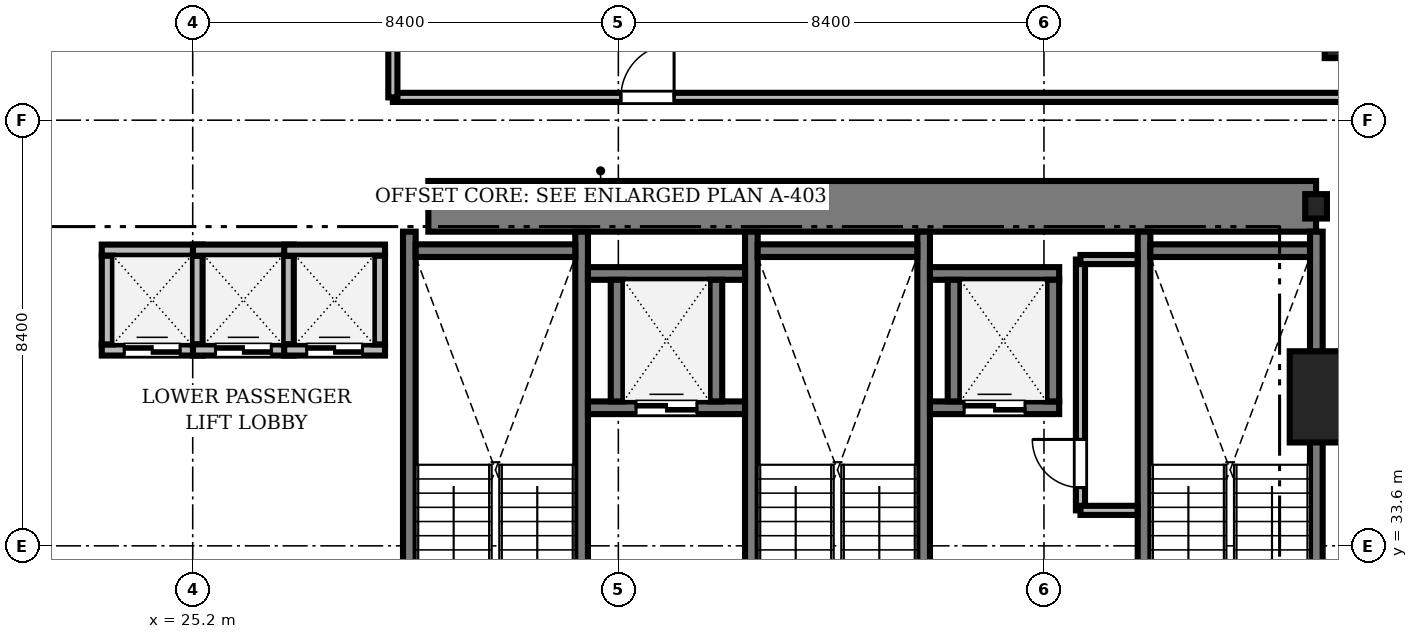
"""IFC4 building model, lengths in metres.
Left out: names, types, materials, properties, quantities, classifications, styles, units other than length and angle.
Written with IfcOpenShell. Run it as: python <this file> out.ifc"""

import sys

from ifc_helpers import new_model, si_unit, direction, frame, frame_2d, origin, origin_2d, place, context, subcontext, project, spatial, rectangle, i_section, extrude, source, transform, mapped, element, fill, save


model = new_model("IFC4")
c1 = context("Model", 3, precision=1e-05, world=origin(), true_north=direction((0.0, 1.0)))
c2 = subcontext(c1, "Body", "Model", "MODEL_VIEW")
j1 = project(units=[si_unit("LENGTHUNIT", "METRE"), si_unit("PLANEANGLEUNIT", "RADIAN")], contexts=[c1])
p1 = place(None, origin())
s1 = spatial("IfcSite", under=j1, at=p1, CompositionType="ELEMENT")
p2 = place(p1, origin())
s2 = spatial("IfcBuilding", under=s1, at=p2, CompositionType="ELEMENT")
p3 = place(p2, frame((0.0, 0.0, 75.05)))
s3 = spatial("IfcBuildingStorey", under=s2, at=p3, CompositionType="ELEMENT", Elevation=75.05)
m1 = source(origin(), c2, "Body", "SweptSolid", [
    extrude(rectangle(XDim=17.52, YDim=1.0, at=frame_2d((8.76, 0.0))), origin(), (0.0, 0.0, 1.0), 3.41),
])
p4 = place(p3, frame((29.85, 40.3, 0.0), z_axis=(0.0, 0.0, 1.0), x_axis=(1.0, 0.0, 0.0)))
e1 = element("IfcWall", 1, at=p4, inside=s3, PredefinedType="SHEAR", context=c2, shape_type="MappedRepresentation", body=[
    mapped(m1, transform((0.0, 0.0, 0.0), scale=1.0)),
])
m2 = source(origin(), c2, "Body", "SweptSolid", [
    extrude(i_section(OverallWidth=0.428, OverallDepth=0.481, WebThickness=0.04, FlangeThickness=0.063, FilletRadius=0.015, at=origin_2d()), origin(), (0.0, 0.0, 1.0), 3.41),
])
p5 = place(p3, frame((47.37, 40.3, 0.0), z_axis=(0.0, 0.0, 1.0), x_axis=(1.0, 0.0, 0.0)))
e2 = element("IfcColumn", 2, at=p5, inside=s3, PredefinedType="COLUMN", context=c2, shape_type="MappedRepresentation", body=[
    mapped(m2, transform((0.0, 0.0, 0.0), scale=1.0)),
])
m3 = source(origin(), c2, "Body", "SweptSolid", [
    extrude(rectangle(XDim=1.8, YDim=1.8, at=origin_2d()), origin(), (0.0, 0.0, 1.0), 3.41),
])
p6 = place(p3, frame((47.75, 36.54, 0.0), z_axis=(0.0, 0.0, 1.0), x_axis=(1.0, 0.0, 0.0)))
e3 = element("IfcColumn", 3, at=p6, inside=s3, PredefinedType="COLUMN", context=c2, shape_type="MappedRepresentation", body=[
    mapped(m3, transform((0.0, 0.0, 0.0), scale=1.0)),
])
m4 = source(origin(), c2, "Body", "SweptSolid", [
    extrude(i_section(OverallWidth=0.419, OverallDepth=0.449, WebThickness=0.031, FlangeThickness=0.048, FilletRadius=0.015, at=origin_2d()), origin(), (0.0, 0.0, 1.0), 3.41),
])
p7 = place(p3, frame((47.75, 43.45, 0.0), z_axis=(0.0, 0.0, 1.0), x_axis=(1.0, 0.0, 0.0)))
e4 = element("IfcColumn", 4, at=p7, inside=s3, PredefinedType="COLUMN", context=c2, shape_type="MappedRepresentation", body=[
    mapped(m4, transform((0.0, 0.0, 0.0), scale=1.0)),
])
m5 = source(origin(), c2, "Body", "SweptSolid", [
    extrude(rectangle(XDim=9.15, YDim=0.25, at=frame_2d((4.575, 0.0))), origin(), (0.0, 0.0, 1.0), 3.45),
])
for number, where, z_axis, x_axis in (
    (5, (29.475, 30.65, 0.0), (0.0, 0.0, 1.0), (0.0, 1.0, 0.0)),
    (6, (32.875, 30.65, 0.0), (0.0, 0.0, 1.0), (0.0, 1.0, 0.0)),
):
    element("IfcWall", number, at=place(p3, frame(where, z_axis=z_axis, x_axis=x_axis)), inside=s3, PredefinedType="SOLIDWALL", context=c2, shape_type="MappedRepresentation", body=[
        mapped(m5, transform((0.0, 0.0, 0.0), scale=1.0)),
    ])
m6 = source(origin(), c2, "Body", "SweptSolid", [
    extrude(rectangle(XDim=3.15, YDim=0.25, at=frame_2d((1.575, 0.0))), origin(), (0.0, 0.0, 1.0), 3.45),
])
p8 = place(p3, frame((29.6, 39.425, 0.0), z_axis=(0.0, 0.0, 1.0), x_axis=(1.0, 0.0, 0.0)))
e7 = element("IfcWall", 7, at=p8, inside=s3, PredefinedType="SOLIDWALL", context=c2, shape_type="MappedRepresentation", body=[
    mapped(m6, transform((0.0, 0.0, 0.0), scale=1.0)),
])
for number, where, z_axis, x_axis in (
    (8, (36.225, 30.65, 0.0), (0.0, 0.0, 1.0), (0.0, 1.0, 0.0)),
    (9, (39.625, 30.65, 0.0), (0.0, 0.0, 1.0), (0.0, 1.0, 0.0)),
):
    element("IfcWall", number, at=place(p3, frame(where, z_axis=z_axis, x_axis=x_axis)), inside=s3, PredefinedType="SOLIDWALL", context=c2, shape_type="MappedRepresentation", body=[
        mapped(m5, transform((0.0, 0.0, 0.0), scale=1.0)),
    ])
p9 = place(p3, frame((36.35, 39.425, 0.0), z_axis=(0.0, 0.0, 1.0), x_axis=(1.0, 0.0, 0.0)))
e10 = element("IfcWall", 10, at=p9, inside=s3, PredefinedType="SOLIDWALL", context=c2, shape_type="MappedRepresentation", body=[
    mapped(m6, transform((0.0, 0.0, 0.0), scale=1.0)),
])
for number, where, z_axis, x_axis in (
    (11, (43.975, 30.65, 0.0), (0.0, 0.0, 1.0), (0.0, 1.0, 0.0)),
    (12, (47.375, 30.65, 0.0), (0.0, 0.0, 1.0), (0.0, 1.0, 0.0)),
):
    element("IfcWall", number, at=place(p3, frame(where, z_axis=z_axis, x_axis=x_axis)), inside=s3, PredefinedType="SOLIDWALL", context=c2, shape_type="MappedRepresentation", body=[
        mapped(m5, transform((0.0, 0.0, 0.0), scale=1.0)),
    ])
p10 = place(p3, frame((44.1, 39.425, 0.0), z_axis=(0.0, 0.0, 1.0), x_axis=(1.0, 0.0, 0.0)))
e13 = element("IfcWall", 13, at=p10, inside=s3, PredefinedType="SOLIDWALL", context=c2, shape_type="MappedRepresentation", body=[
    mapped(m6, transform((0.0, 0.0, 0.0), scale=1.0)),
])
m7 = source(origin(), c2, "Body", "SweptSolid", [
    extrude(rectangle(XDim=1.99, YDim=0.22, at=frame_2d((0.995, 0.0))), origin(), (0.0, 0.0, 1.0), 3.41),
])
p11 = place(p3, frame((23.405, 37.465, 0.0), z_axis=(0.0, 0.0, 1.0), x_axis=(1.0, 0.0, 0.0)))
e14 = element("IfcWall", 14, at=p11, inside=s3, PredefinedType="SOLIDWALL", context=c2, shape_type="MappedRepresentation", body=[
    mapped(m7, transform((0.0, 0.0, 0.0), scale=1.0)),
])
m8 = source(origin(), c2, "Body", "SweptSolid", [
    extrude(rectangle(XDim=1.1, YDim=2.2, at=frame_2d((0.55, 1.1))), frame((0.0, 0.12, 0.0), z_axis=(0.0, -1.0, 0.0), x_axis=(1.0, 0.0, 0.0)), (0.0, 0.0, 1.0), 0.24),
])
p12 = place(p11, frame((0.445, 0.0, 0.0)))
e15 = element("IfcOpeningElement", 15, at=p12, cuts=e14, PredefinedType="OPENING", context=c2, shape_type="MappedRepresentation", body=[
    mapped(m8, transform((0.0, 0.0, 0.0), scale=1.0)),
])
p13 = place(p3, frame((23.405, 39.435, 0.0), z_axis=(0.0, 0.0, 1.0), x_axis=(1.0, 0.0, 0.0)))
e16 = element("IfcWall", 16, at=p13, inside=s3, PredefinedType="SOLIDWALL", context=c2, shape_type="MappedRepresentation", body=[
    mapped(m7, transform((0.0, 0.0, 0.0), scale=1.0)),
])
m9 = source(origin(), c2, "Body", "SweptSolid", [
    extrude(rectangle(XDim=1.75, YDim=0.22, at=frame_2d((0.875, 0.0))), origin(), (0.0, 0.0, 1.0), 3.41),
])
for number, where, z_axis, x_axis in (
    (17, (23.515, 37.575, 0.0), (0.0, 0.0, 1.0), (0.0, 1.0, 0.0)),
    (18, (25.285, 37.575, 0.0), (0.0, 0.0, 1.0), (0.0, 1.0, 0.0)),
):
    element("IfcWall", number, at=place(p3, frame(where, z_axis=z_axis, x_axis=x_axis)), inside=s3, PredefinedType="SOLIDWALL", context=c2, shape_type="MappedRepresentation", body=[
        mapped(m9, transform((0.0, 0.0, 0.0), scale=1.0)),
    ])
p14 = place(p3, frame((25.205, 37.465, 0.0), z_axis=(0.0, 0.0, 1.0), x_axis=(1.0, 0.0, 0.0)))
e19 = element("IfcWall", 19, at=p14, inside=s3, PredefinedType="SOLIDWALL", context=c2, shape_type="MappedRepresentation", body=[
    mapped(m7, transform((0.0, 0.0, 0.0), scale=1.0)),
])
p15 = place(p14, frame((0.445, 0.0, 0.0)))
e20 = element("IfcOpeningElement", 20, at=p15, cuts=e19, PredefinedType="OPENING", context=c2, shape_type="MappedRepresentation", body=[
    mapped(m8, transform((0.0, 0.0, 0.0), scale=1.0)),
])
p16 = place(p3, frame((25.205, 39.435, 0.0), z_axis=(0.0, 0.0, 1.0), x_axis=(1.0, 0.0, 0.0)))
e21 = element("IfcWall", 21, at=p16, inside=s3, PredefinedType="SOLIDWALL", context=c2, shape_type="MappedRepresentation", body=[
    mapped(m7, transform((0.0, 0.0, 0.0), scale=1.0)),
])
p17 = place(p3, frame((27.085, 37.575, 0.0), z_axis=(0.0, 0.0, 1.0), x_axis=(0.0, 1.0, 0.0)))
e22 = element("IfcWall", 22, at=p17, inside=s3, PredefinedType="SOLIDWALL", context=c2, shape_type="MappedRepresentation", body=[
    mapped(m9, transform((0.0, 0.0, 0.0), scale=1.0)),
])
m10 = source(origin(), c2, "Body", "SweptSolid", [
    extrude(rectangle(XDim=1.99, YDim=0.22, at=frame_2d((0.995, 0.0))), origin(), (0.0, 0.0, 1.0), 3.41),
])
p18 = place(p3, frame((27.005, 37.465, 0.0), z_axis=(0.0, 0.0, 1.0), x_axis=(1.0, 0.0, 0.0)))
e23 = element("IfcWall", 23, at=p18, inside=s3, PredefinedType="SOLIDWALL", context=c2, shape_type="MappedRepresentation", body=[
    mapped(m10, transform((0.0, 0.0, 0.0), scale=1.0)),
])
p19 = place(p18, frame((0.445, 0.0, 0.0)))
e24 = element("IfcOpeningElement", 24, at=p19, cuts=e23, PredefinedType="OPENING", context=c2, shape_type="MappedRepresentation", body=[
    mapped(m8, transform((0.0, 0.0, 0.0), scale=1.0)),
])
p20 = place(p3, frame((27.005, 39.435, 0.0), z_axis=(0.0, 0.0, 1.0), x_axis=(1.0, 0.0, 0.0)))
e25 = element("IfcWall", 25, at=p20, inside=s3, PredefinedType="SOLIDWALL", context=c2, shape_type="MappedRepresentation", body=[
    mapped(m10, transform((0.0, 0.0, 0.0), scale=1.0)),
])
p21 = place(p3, frame((28.885, 37.575, 0.0), z_axis=(0.0, 0.0, 1.0), x_axis=(0.0, 1.0, 0.0)))
e26 = element("IfcWall", 26, at=p21, inside=s3, PredefinedType="SOLIDWALL", context=c2, shape_type="MappedRepresentation", body=[
    mapped(m9, transform((0.0, 0.0, 0.0), scale=1.0)),
])
m11 = source(origin(), c2, "Body", "SweptSolid", [
    extrude(rectangle(XDim=3.1, YDim=0.25, at=frame_2d((1.55, 0.0))), origin(), (0.0, 0.0, 1.0), 3.41),
])
p22 = place(p3, frame((33.0, 36.325, 0.0), z_axis=(0.0, 0.0, 1.0), x_axis=(1.0, 0.0, 0.0)))
e27 = element("IfcWall", 27, at=p22, inside=s3, PredefinedType="SOLIDWALL", context=c2, shape_type="MappedRepresentation", body=[
    mapped(m11, transform((0.0, 0.0, 0.0), scale=1.0)),
])
m12 = source(origin(), c2, "Body", "SweptSolid", [
    extrude(rectangle(XDim=1.2, YDim=2.25, at=frame_2d((0.6, 1.125))), frame((0.0, 0.135, 0.0), z_axis=(0.0, -1.0, 0.0), x_axis=(1.0, 0.0, 0.0)), (0.0, 0.0, 1.0), 0.27),
])
p23 = place(p22, frame((0.95, 0.0, 0.0)))
e28 = element("IfcOpeningElement", 28, at=p23, cuts=e27, PredefinedType="OPENING", context=c2, shape_type="MappedRepresentation", body=[
    mapped(m12, transform((0.0, 0.0, 0.0), scale=1.0)),
])
p24 = place(p3, frame((33.0, 38.975, 0.0), z_axis=(0.0, 0.0, 1.0), x_axis=(1.0, 0.0, 0.0)))
e29 = element("IfcWall", 29, at=p24, inside=s3, PredefinedType="SOLIDWALL", context=c2, shape_type="MappedRepresentation", body=[
    mapped(m11, transform((0.0, 0.0, 0.0), scale=1.0)),
])
m13 = source(origin(), c2, "Body", "SweptSolid", [
    extrude(rectangle(XDim=2.4, YDim=0.25, at=frame_2d((1.2, 0.0))), origin(), (0.0, 0.0, 1.0), 3.41),
])
for number, where, z_axis, x_axis in (
    (30, (33.575, 36.45, 0.0), (0.0, 0.0, 1.0), (0.0, 1.0, 0.0)),
    (31, (35.525, 36.45, 0.0), (0.0, 0.0, 1.0), (0.0, 1.0, 0.0)),
):
    element("IfcWall", number, at=place(p3, frame(where, z_axis=z_axis, x_axis=x_axis)), inside=s3, PredefinedType="SOLIDWALL", context=c2, shape_type="MappedRepresentation", body=[
        mapped(m13, transform((0.0, 0.0, 0.0), scale=1.0)),
    ])
m14 = source(origin(), c2, "Body", "SweptSolid", [
    extrude(rectangle(XDim=2.55, YDim=0.25, at=frame_2d((1.275, 0.0))), origin(), (0.0, 0.0, 1.0), 3.41),
])
p25 = place(p3, frame((39.75, 36.325, 0.0), z_axis=(0.0, 0.0, 1.0), x_axis=(1.0, 0.0, 0.0)))
e32 = element("IfcWall", 32, at=p25, inside=s3, PredefinedType="SOLIDWALL", context=c2, shape_type="MappedRepresentation", body=[
    mapped(m14, transform((0.0, 0.0, 0.0), scale=1.0)),
])
p26 = place(p25, frame((0.675, 0.0, 0.0)))
e33 = element("IfcOpeningElement", 33, at=p26, cuts=e32, PredefinedType="OPENING", context=c2, shape_type="MappedRepresentation", body=[
    mapped(m12, transform((0.0, 0.0, 0.0), scale=1.0)),
])
p27 = place(p3, frame((39.75, 38.975, 0.0), z_axis=(0.0, 0.0, 1.0), x_axis=(1.0, 0.0, 0.0)))
e34 = element("IfcWall", 34, at=p27, inside=s3, PredefinedType="SOLIDWALL", context=c2, shape_type="MappedRepresentation", body=[
    mapped(m14, transform((0.0, 0.0, 0.0), scale=1.0)),
])
for number, where, z_axis, x_axis in (
    (35, (40.225, 36.45, 0.0), (0.0, 0.0, 1.0), (0.0, 1.0, 0.0)),
    (36, (42.175, 36.45, 0.0), (0.0, 0.0, 1.0), (0.0, 1.0, 0.0)),
):
    element("IfcWall", number, at=place(p3, frame(where, z_axis=z_axis, x_axis=x_axis)), inside=s3, PredefinedType="SOLIDWALL", context=c2, shape_type="MappedRepresentation", body=[
        mapped(m13, transform((0.0, 0.0, 0.0), scale=1.0)),
    ])
m15 = source(origin(), c2, "Body", "SweptSolid", [
    extrude(rectangle(XDim=19.428, YDim=0.18, at=frame_2d((9.714, 0.0))), origin(), (0.0, 0.0, 1.0), 2.652),
])
p28 = place(p3, frame((29.15, 42.45, 0.0), z_axis=(0.0, 0.0, 1.0), x_axis=(1.0, 0.0, 0.0)))
e37 = element("IfcWall", 37, at=p28, inside=s3, PredefinedType="PARTITIONING", context=c2, shape_type="MappedRepresentation", body=[
    mapped(m15, transform((0.0, 0.0, 0.0), scale=1.0)),
])
m16 = source(origin(), c2, "Body", "SweptSolid", [
    extrude(rectangle(XDim=1.05, YDim=2.2, at=frame_2d((0.525, 1.1))), frame((0.0, 0.1, 0.0), z_axis=(0.0, -1.0, 0.0), x_axis=(1.0, 0.0, 0.0)), (0.0, 0.0, 1.0), 0.2),
])
p29 = place(p28, frame((4.5, 0.0, 0.0)))
e38 = element("IfcOpeningElement", 38, at=p29, cuts=e37, PredefinedType="OPENING", context=c2, shape_type="MappedRepresentation", body=[
    mapped(m16, transform((0.0, 0.0, 0.0), scale=1.0)),
])
m17 = source(origin(), c2, "Body", "SweptSolid", [
    extrude(rectangle(XDim=4.95, YDim=0.18, at=frame_2d((2.475, 0.0))), origin(), (0.0, 0.0, 1.0), 3.41),
])
p30 = place(p3, frame((42.72, 34.3, 0.0), z_axis=(0.0, 0.0, 1.0), x_axis=(0.0, 1.0, 0.0)))
e39 = element("IfcWall", 39, at=p30, inside=s3, PredefinedType="PARTITIONING", context=c2, shape_type="MappedRepresentation", body=[
    mapped(m17, transform((0.0, 0.0, 0.0), scale=1.0)),
])
m18 = source(origin(), c2, "Body", "SweptSolid", [
    extrude(rectangle(XDim=0.95, YDim=2.15, at=frame_2d((0.475, 1.075))), frame((0.0, 0.1, 0.0), z_axis=(0.0, -1.0, 0.0), x_axis=(1.0, 0.0, 0.0)), (0.0, 0.0, 1.0), 0.2),
])
p31 = place(p30, frame((0.45, 0.0, 0.0)))
e40 = element("IfcOpeningElement", 40, at=p31, cuts=e39, PredefinedType="OPENING", context=c2, shape_type="MappedRepresentation", body=[
    mapped(m18, transform((0.0, 0.0, 0.0), scale=1.0)),
])
m19 = source(origin(), c2, "Body", "SweptSolid", [
    extrude(rectangle(XDim=5.828, YDim=0.18, at=frame_2d((2.914, 0.0))), origin(), (0.0, 0.0, 1.0), 2.652),
])
p32 = place(p3, frame((29.15, 42.45, 0.0), z_axis=(0.0, 0.0, 1.0), x_axis=(0.0, 1.0, 0.0)))
e41 = element("IfcWall", 41, at=p32, inside=s3, PredefinedType="PARTITIONING", context=c2, shape_type="MappedRepresentation", body=[
    mapped(m19, transform((0.0, 0.0, 0.0), scale=1.0)),
])
m20 = source(origin(), c2, "Body", "SweptSolid", [
    extrude(rectangle(XDim=1.128, YDim=0.18, at=frame_2d((0.564, 0.0))), origin(), (0.0, 0.0, 1.0), 3.41),
])
for number, where, z_axis, x_axis in (
    (42, (42.72, 34.3, 0.0), (0.0, 0.0, 1.0), (1.0, 0.0, 0.0)),
    (43, (42.72, 39.25, 0.0), (0.0, 0.0, 1.0), (1.0, 0.0, 0.0)),
):
    element("IfcWall", number, at=place(p3, frame(where, z_axis=z_axis, x_axis=x_axis)), inside=s3, PredefinedType="PARTITIONING", context=c2, shape_type="MappedRepresentation", body=[
        mapped(m20, transform((0.0, 0.0, 0.0), scale=1.0)),
    ])
m21 = source(origin(), c2, "Body", "SweptSolid", [
    extrude(rectangle(XDim=1.1, YDim=2.2, at=frame_2d((0.55, 1.1))), frame((0.0, 0.025, 0.0), z_axis=(0.0, -1.0, 0.0), x_axis=(1.0, 0.0, 0.0)), (0.0, 0.0, 1.0), 0.05),
])
p33 = place(p12, origin())
e44 = element("IfcDoor", 44, at=p33, inside=s3, OperationType="DOUBLE_DOOR_SLIDING", PredefinedType="DOOR", context=c2, shape_type="MappedRepresentation", body=[
    mapped(m21, transform((0.0, 0.0, 0.0), scale=1.0)),
])
fill(e15, e44)
p34 = place(p15, origin())
e45 = element("IfcDoor", 45, at=p34, inside=s3, OperationType="DOUBLE_DOOR_SLIDING", PredefinedType="DOOR", context=c2, shape_type="MappedRepresentation", body=[
    mapped(m21, transform((0.0, 0.0, 0.0), scale=1.0)),
])
fill(e20, e45)
p35 = place(p19, origin())
e46 = element("IfcDoor", 46, at=p35, inside=s3, OperationType="DOUBLE_DOOR_SLIDING", PredefinedType="DOOR", context=c2, shape_type="MappedRepresentation", body=[
    mapped(m21, transform((0.0, 0.0, 0.0), scale=1.0)),
])
fill(e24, e46)
m22 = source(origin(), c2, "Body", "SweptSolid", [
    extrude(rectangle(XDim=1.2, YDim=2.25, at=frame_2d((0.6, 1.125))), frame((0.0, 0.025, 0.0), z_axis=(0.0, -1.0, 0.0), x_axis=(1.0, 0.0, 0.0)), (0.0, 0.0, 1.0), 0.05),
])
p36 = place(p23, origin())
e47 = element("IfcDoor", 47, at=p36, inside=s3, OperationType="DOUBLE_DOOR_SLIDING", PredefinedType="DOOR", context=c2, shape_type="MappedRepresentation", body=[
    mapped(m22, transform((0.0, 0.0, 0.0), scale=1.0)),
])
fill(e28, e47)
p37 = place(p26, origin())
e48 = element("IfcDoor", 48, at=p37, inside=s3, OperationType="DOUBLE_DOOR_SLIDING", PredefinedType="DOOR", context=c2, shape_type="MappedRepresentation", body=[
    mapped(m22, transform((0.0, 0.0, 0.0), scale=1.0)),
])
fill(e33, e48)
m23 = source(origin(), c2, "Body", "SweptSolid", [
    extrude(rectangle(XDim=1.05, YDim=2.2, at=frame_2d((0.525, 1.1))), frame((0.0, 0.025, 0.0), z_axis=(0.0, -1.0, 0.0), x_axis=(1.0, 0.0, 0.0)), (0.0, 0.0, 1.0), 0.05),
])
p38 = place(p29, origin())
e49 = element("IfcDoor", 49, at=p38, inside=s3, OperationType="SINGLE_SWING_RIGHT", PredefinedType="DOOR", context=c2, shape_type="MappedRepresentation", body=[
    mapped(m23, transform((0.0, 0.0, 0.0), scale=1.0)),
])
fill(e38, e49)
m24 = source(origin(), c2, "Body", "SweptSolid", [
    extrude(rectangle(XDim=0.95, YDim=2.15, at=frame_2d((0.475, 1.075))), frame((0.0, 0.025, 0.0), z_axis=(0.0, -1.0, 0.0), x_axis=(1.0, 0.0, 0.0)), (0.0, 0.0, 1.0), 0.05),
])
p39 = place(p31, origin())
e50 = element("IfcDoor", 50, at=p39, inside=s3, OperationType="SINGLE_SWING_RIGHT", PredefinedType="DOOR", context=c2, shape_type="MappedRepresentation", body=[
    mapped(m24, transform((0.0, 0.0, 0.0), scale=1.0)),
])
fill(e40, e50)
save(model, sys.argv[1])
